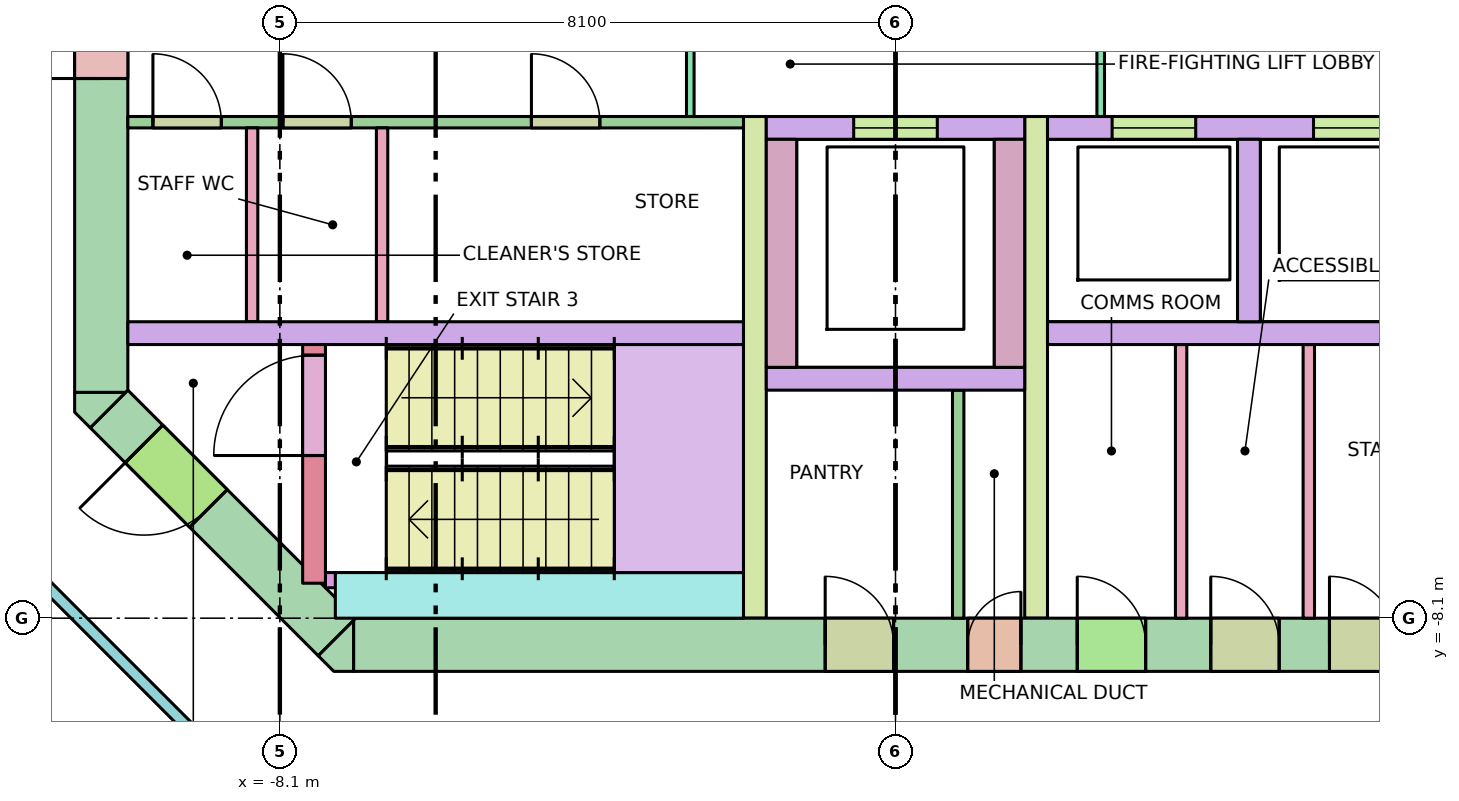
"""IFC4 building model, lengths in metres.
Left out: names, types, materials, properties, quantities, classifications, styles, units other than length and angle.
Written with IfcOpenShell. Run it as: python <this file> out.ifc"""

import sys

from ifc_helpers import new_model, si_unit, direction, frame, frame_2d, origin, place, context, subcontext, project, spatial, polyline, rectangle, outline, extrude, element, fill, save


model = new_model("IFC4")
c1 = context("Model", 3, precision=1e-05, world=origin(), true_north=direction((0.0, 1.0)))
c2 = subcontext(c1, "Body", "Model", "MODEL_VIEW")
j1 = project(units=[si_unit("LENGTHUNIT", "METRE"), si_unit("PLANEANGLEUNIT", "RADIAN")], contexts=[c1])
p1 = place(None, origin())
s1 = spatial("IfcSite", under=j1, at=p1, CompositionType="ELEMENT")
p2 = place(p1, origin())
s2 = spatial("IfcBuilding", under=s1, at=p2, CompositionType="ELEMENT")
p3 = place(p2, frame((0.0, 0.0, 237.2)))
s3 = spatial("IfcBuildingStorey", under=s2, at=p3, CompositionType="ELEMENT", Elevation=237.2)
p4 = place(p3, frame((-7.13, -8.45, -0.28), z_axis=(0.0, 0.0, 1.0), x_axis=(1.0, 0.0, 0.0)))
e1 = element("IfcWall", 1, at=p4, inside=s3, PredefinedType="SHEAR", context=c2, shape_type="SweptSolid", body=[
    extrude(rectangle(XDim=14.26, YDim=0.7, at=frame_2d((7.13, 0.0))), origin(), (0.0, 0.0, 1.0), 3.7),
])
p5 = place(p4, frame((8.08, 0.0, 0.28)))
e2 = element("IfcOpeningElement", 2, at=p5, cuts=e1, PredefinedType="OPENING", context=c2, shape_type="SweptSolid", body=[
    extrude(rectangle(XDim=0.7, YDim=2.1, at=frame_2d((0.35, 1.05))), frame((0.0, 0.36, 0.0), z_axis=(0.0, -1.0, 0.0), x_axis=(1.0, 0.0, 0.0)), (0.0, 0.0, 1.0), 0.72),
])
p6 = place(p4, frame((6.205, 0.0, 0.28)))
e3 = element("IfcOpeningElement", 3, at=p6, cuts=e1, PredefinedType="OPENING", context=c2, shape_type="SweptSolid", body=[
    extrude(rectangle(XDim=0.9, YDim=2.1, at=frame_2d((0.45, 1.05))), frame((0.0, 0.36, 0.0), z_axis=(0.0, -1.0, 0.0), x_axis=(1.0, 0.0, 0.0)), (0.0, 0.0, 1.0), 0.72),
])
p7 = place(p4, frame((9.521, 0.0, 0.28)))
e4 = element("IfcOpeningElement", 4, at=p7, cuts=e1, PredefinedType="OPENING", context=c2, shape_type="SweptSolid", body=[
    extrude(rectangle(XDim=0.9, YDim=2.1, at=frame_2d((0.45, 1.05))), frame((0.0, 0.36, 0.0), z_axis=(0.0, -1.0, 0.0), x_axis=(1.0, 0.0, 0.0)), (0.0, 0.0, 1.0), 0.72),
])
p8 = place(p4, frame((11.278, 0.0, 0.28)))
e5 = element("IfcOpeningElement", 5, at=p8, cuts=e1, PredefinedType="OPENING", context=c2, shape_type="SweptSolid", body=[
    extrude(rectangle(XDim=0.9, YDim=2.1, at=frame_2d((0.45, 1.05))), frame((0.0, 0.36, 0.0), z_axis=(0.0, -1.0, 0.0), x_axis=(1.0, 0.0, 0.0)), (0.0, 0.0, 1.0), 0.72),
])
p9 = place(p4, frame((12.84, 0.0, 0.28)))
e6 = element("IfcOpeningElement", 6, at=p9, cuts=e1, PredefinedType="OPENING", context=c2, shape_type="SweptSolid", body=[
    extrude(rectangle(XDim=0.9, YDim=2.1, at=frame_2d((0.45, 1.05))), frame((0.0, 0.36, 0.0), z_axis=(0.0, -1.0, 0.0), x_axis=(1.0, 0.0, 0.0)), (0.0, 0.0, 1.0), 0.72),
])
p10 = place(p3, frame((-10.45, -5.13, -0.28), z_axis=(0.0, 0.0, 1.0), x_axis=(0.0, 1.0, 0.0)))
e7 = element("IfcWall", 7, at=p10, inside=s3, PredefinedType="SHEAR", context=c2, shape_type="SweptSolid", body=[
    extrude(rectangle(XDim=10.26, YDim=0.7, at=frame_2d((5.13, 0.0))), origin(), (0.0, 0.0, 1.0), 3.7),
])
p11 = place(p10, frame((4.13, 0.0, 0.28)))
e8 = element("IfcOpeningElement", 8, at=p11, cuts=e7, PredefinedType="OPENING", context=c2, shape_type="SweptSolid", body=[
    extrude(rectangle(XDim=2.0, YDim=2.1, at=frame_2d((1.0, 1.05))), frame((0.0, 0.36, 0.0), z_axis=(0.0, -1.0, 0.0), x_axis=(1.0, 0.0, 0.0)), (0.0, 0.0, 1.0), 0.72),
])
p12 = place(p3, frame((-7.347, -8.347, -0.28), z_axis=(0.0, 0.0, 1.0), x_axis=(-0.707106781187, 0.707106781187, 0.0)))
e9 = element("IfcWall", 9, at=p12, inside=s3, PredefinedType="SHEAR", context=c2, shape_type="SweptSolid", body=[
    extrude(rectangle(XDim=4.243, YDim=0.7, at=frame_2d((2.121, 0.0))), origin(), (0.0, 0.0, 1.0), 3.7),
])
p13 = place(p12, frame((2.393, 0.0, 0.28)))
e10 = element("IfcOpeningElement", 10, at=p13, cuts=e9, PredefinedType="OPENING", context=c2, shape_type="SweptSolid", body=[
    extrude(rectangle(XDim=1.2, YDim=2.1, at=frame_2d((0.6, 1.05))), frame((0.0, 0.36, 0.0), z_axis=(0.0, -1.0, 0.0), x_axis=(1.0, 0.0, 0.0)), (0.0, 0.0, 1.0), 0.72),
])
p14 = place(p3, frame((0.0, 0.0, -0.28)))
e11 = element("IfcWall", 11, at=p14, inside=s3, PredefinedType="SHEAR", context=c2, shape_type="SweptSolid", body=[
    extrude(outline(polyline([(-7.39, -8.8), (-7.595, -8.595), (-7.595, -8.595), (-7.595, -8.595), (-7.13, -8.13), (-7.13, -8.8), (-7.13, -8.8), (-7.39, -8.8)])), origin(), (0.0, 0.0, 1.0), 3.7),
])
p15 = place(p3, frame((0.0, 0.0, -0.28)))
e12 = element("IfcWall", 12, at=p15, inside=s3, PredefinedType="SHEAR", context=c2, shape_type="SweptSolid", body=[
    extrude(outline(polyline([(-10.8, -5.39), (-10.8, -5.13), (-10.8, -5.13), (-10.13, -5.13), (-10.595, -5.595), (-10.595, -5.595), (-10.595, -5.595), (-10.8, -5.39)])), origin(), (0.0, 0.0, 1.0), 3.7),
])
for number, where, z_axis, x_axis in (
    (13, (-10.1, -4.35, 0.0), (0.0, 0.0, 1.0), (1.0, 0.0, 0.0)),
    (14, (2.0, -4.35, 0.0), (0.0, 0.0, 1.0), (1.0, 0.0, 0.0)),
):
    element("IfcWall", number, at=place(p3, frame(where, z_axis=z_axis, x_axis=x_axis)), inside=s3, PredefinedType="SOLIDWALL", context=c2, shape_type="SweptSolid", body=[
        extrude(rectangle(XDim=8.1, YDim=0.3, at=frame_2d((4.05, 0.0))), origin(), (0.0, 0.0, 1.0), 3.42),
    ])
p16 = place(p3, frame((2.0, -1.65, 0.0), z_axis=(0.0, 0.0, 1.0), x_axis=(1.0, 0.0, 0.0)))
e15 = element("IfcWall", 15, at=p16, inside=s3, PredefinedType="SOLIDWALL", context=c2, shape_type="SweptSolid", body=[
    extrude(rectangle(XDim=8.1, YDim=0.3, at=frame_2d((4.05, 0.0))), origin(), (0.0, 0.0, 1.0), 3.42),
])
p17 = place(p16, frame((0.85, 0.0, 0.0)))
e16 = element("IfcOpeningElement", 16, at=p17, cuts=e15, PredefinedType="OPENING", context=c2, shape_type="SweptSolid", body=[
    extrude(rectangle(XDim=1.1, YDim=2.1, at=frame_2d((0.55, 1.05))), frame((0.0, 0.16, 0.0), z_axis=(0.0, -1.0, 0.0), x_axis=(1.0, 0.0, 0.0)), (0.0, 0.0, 1.0), 0.32),
])
p18 = place(p16, frame((3.5, 0.0, 0.0)))
e17 = element("IfcOpeningElement", 17, at=p18, cuts=e15, PredefinedType="OPENING", context=c2, shape_type="SweptSolid", body=[
    extrude(rectangle(XDim=1.1, YDim=2.1, at=frame_2d((0.55, 1.05))), frame((0.0, 0.16, 0.0), z_axis=(0.0, -1.0, 0.0), x_axis=(1.0, 0.0, 0.0)), (0.0, 0.0, 1.0), 0.32),
])
p19 = place(p16, frame((6.3, 0.0, 0.0)))
e18 = element("IfcOpeningElement", 18, at=p19, cuts=e15, PredefinedType="OPENING", context=c2, shape_type="SweptSolid", body=[
    extrude(rectangle(XDim=1.1, YDim=2.1, at=frame_2d((0.55, 1.05))), frame((0.0, 0.16, 0.0), z_axis=(0.0, -1.0, 0.0), x_axis=(1.0, 0.0, 0.0)), (0.0, 0.0, 1.0), 0.32),
])
p20 = place(p3, frame((4.65, -4.2, 0.0), z_axis=(0.0, 0.0, 1.0), x_axis=(0.0, 1.0, 0.0)))
e19 = element("IfcWall", 19, at=p20, inside=s3, PredefinedType="SOLIDWALL", context=c2, shape_type="SweptSolid", body=[
    extrude(rectangle(XDim=2.4, YDim=0.3, at=frame_2d((1.2, 0.0))), origin(), (0.0, 0.0, 1.0), 3.42),
])
for number, where, z_axis, x_axis in (
    (20, (-1.85, -8.1, 0.0), (0.0, 0.0, 1.0), (0.0, 1.0, 0.0)),
    (21, (1.85, -8.1, 0.0), (0.0, 0.0, 1.0), (0.0, 1.0, 0.0)),
):
    element("IfcWall", number, at=place(p3, frame(where, z_axis=z_axis, x_axis=x_axis)), inside=s3, PredefinedType="SHEAR", context=c2, shape_type="SweptSolid", body=[
        extrude(rectangle(XDim=6.6, YDim=0.3, at=frame_2d((3.3, 0.0))), origin(), (0.0, 0.0, 1.0), 3.42),
    ])
p21 = place(p3, frame((-1.7, -1.65, 0.0), z_axis=(0.0, 0.0, 1.0), x_axis=(1.0, 0.0, 0.0)))
e22 = element("IfcWall", 22, at=p21, inside=s3, PredefinedType="SOLIDWALL", context=c2, shape_type="SweptSolid", body=[
    extrude(rectangle(XDim=3.4, YDim=0.3, at=frame_2d((1.7, 0.0))), origin(), (0.0, 0.0, 1.0), 3.42),
])
p22 = place(p21, frame((1.15, 0.0, 0.0)))
e23 = element("IfcOpeningElement", 23, at=p22, cuts=e22, PredefinedType="OPENING", context=c2, shape_type="SweptSolid", body=[
    extrude(rectangle(XDim=1.1, YDim=2.1, at=frame_2d((0.55, 1.05))), frame((0.0, 0.16, 0.0), z_axis=(0.0, -1.0, 0.0), x_axis=(1.0, 0.0, 0.0)), (0.0, 0.0, 1.0), 0.32),
])
for number, where, z_axis, x_axis in (
    (24, (-1.5, -4.8, 0.0), (0.0, 0.0, 1.0), (0.0, 1.0, 0.0)),
    (25, (1.5, -4.8, 0.0), (0.0, 0.0, 1.0), (0.0, 1.0, 0.0)),
):
    element("IfcWall", number, at=place(p3, frame(where, z_axis=z_axis, x_axis=x_axis)), inside=s3, PredefinedType="SOLIDWALL", context=c2, shape_type="SweptSolid", body=[
        extrude(rectangle(XDim=3.0, YDim=0.4, at=frame_2d((1.5, 0.0))), origin(), (0.0, 0.0, 1.0), 3.42),
    ])
p23 = place(p3, frame((-1.7, -4.95, 0.0), z_axis=(0.0, 0.0, 1.0), x_axis=(1.0, 0.0, 0.0)))
e26 = element("IfcWall", 26, at=p23, inside=s3, PredefinedType="SOLIDWALL", context=c2, shape_type="SweptSolid", body=[
    extrude(rectangle(XDim=3.4, YDim=0.3, at=frame_2d((1.7, 0.0))), origin(), (0.0, 0.0, 1.0), 3.42),
])
p24 = place(p3, frame((-7.65, -7.64, 0.0), z_axis=(0.0, 0.0, 1.0), x_axis=(0.0, 1.0, 0.0)))
e27 = element("IfcWall", 27, at=p24, inside=s3, PredefinedType="SHEAR", context=c2, shape_type="SweptSolid", body=[
    extrude(rectangle(XDim=3.14, YDim=0.3, at=frame_2d((1.57, 0.0))), origin(), (0.0, 0.0, 1.0), 3.42),
])
p25 = place(p24, frame((1.68, 0.0, 0.0)))
e28 = element("IfcOpeningElement", 28, at=p25, cuts=e27, PredefinedType="OPENING", context=c2, shape_type="SweptSolid", body=[
    extrude(rectangle(XDim=1.32, YDim=2.1, at=frame_2d((0.66, 1.05))), frame((0.0, 0.16, 0.0), z_axis=(0.0, -1.0, 0.0), x_axis=(1.0, 0.0, 0.0)), (0.0, 0.0, 1.0), 0.32),
])
p26 = place(p3, frame((-7.5, -7.6, 0.0), z_axis=(0.0, 0.0, 1.0), x_axis=(1.0, 0.0, 0.0)))
e29 = element("IfcWall", 29, at=p26, inside=s3, PredefinedType="SHEAR", context=c2, shape_type="SweptSolid", body=[
    extrude(rectangle(XDim=0.6, YDim=0.2, at=frame_2d((0.3, 0.0))), origin(), (0.0, 0.0, 1.0), 3.42),
])
p27 = place(p3, frame((-7.37, -7.8, 0.0), z_axis=(0.0, 0.0, 1.0), x_axis=(1.0, 0.0, 0.0)))
e30 = element("IfcWall", 30, at=p27, inside=s3, PredefinedType="SHEAR", context=c2, shape_type="SweptSolid", body=[
    extrude(rectangle(XDim=5.37, YDim=0.6, at=frame_2d((2.685, 0.0))), origin(), (0.0, 0.0, 1.0), 3.42),
])
p28 = place(p3, frame((-2.7, -1.5, 0.0), z_axis=(0.0, 0.0, 1.0), x_axis=(0.0, 1.0, 0.0)))
e31 = element("IfcWall", 31, at=p28, inside=s3, PredefinedType="PARTITIONING", context=c2, shape_type="SweptSolid", body=[
    extrude(rectangle(XDim=3.0, YDim=0.1, at=frame_2d((1.5, 0.0))), origin(), (0.0, 0.0, 1.0), 3.42),
])
p29 = place(p28, frame((0.9, 0.0, 0.0)))
e32 = element("IfcOpeningElement", 32, at=p29, cuts=e31, PredefinedType="OPENING", context=c2, shape_type="SweptSolid", body=[
    extrude(rectangle(XDim=1.2, YDim=2.1, at=frame_2d((0.6, 1.05))), frame((0.0, 0.06, 0.0), z_axis=(0.0, -1.0, 0.0), x_axis=(1.0, 0.0, 0.0)), (0.0, 0.0, 1.0), 0.12),
])
p30 = place(p3, frame((2.7, -1.5, 0.0), z_axis=(0.0, 0.0, 1.0), x_axis=(0.0, 1.0, 0.0)))
e33 = element("IfcWall", 33, at=p30, inside=s3, PredefinedType="PARTITIONING", context=c2, shape_type="SweptSolid", body=[
    extrude(rectangle(XDim=3.0, YDim=0.1, at=frame_2d((1.5, 0.0))), origin(), (0.0, 0.0, 1.0), 3.42),
])
p31 = place(p30, frame((0.9, 0.0, 0.0)))
e34 = element("IfcOpeningElement", 34, at=p31, cuts=e33, PredefinedType="OPENING", context=c2, shape_type="SweptSolid", body=[
    extrude(rectangle(XDim=1.2, YDim=2.1, at=frame_2d((0.6, 1.05))), frame((0.0, 0.06, 0.0), z_axis=(0.0, -1.0, 0.0), x_axis=(1.0, 0.0, 0.0)), (0.0, 0.0, 1.0), 0.12),
])
p32 = place(p3, frame((0.825, -8.1, 0.0), z_axis=(0.0, 0.0, 1.0), x_axis=(0.0, 1.0, 0.0)))
e35 = element("IfcWall", 35, at=p32, inside=s3, PredefinedType="PARTITIONING", context=c2, shape_type="SweptSolid", body=[
    extrude(rectangle(XDim=3.0, YDim=0.15, at=frame_2d((1.5, 0.0))), origin(), (0.0, 0.0, 1.0), 3.42),
])
for number, where, z_axis, x_axis in (
    (36, (3.758, -8.1, 0.0), (0.0, 0.0, 1.0), (0.0, 1.0, 0.0)),
    (37, (5.438, -8.1, 0.0), (0.0, 0.0, 1.0), (0.0, 1.0, 0.0)),
):
    element("IfcWall", number, at=place(p3, frame(where, z_axis=z_axis, x_axis=x_axis)), inside=s3, PredefinedType="PARTITIONING", context=c2, shape_type="SweptSolid", body=[
        extrude(rectangle(XDim=3.6, YDim=0.15, at=frame_2d((1.8, 0.0))), origin(), (0.0, 0.0, 1.0), 3.42),
    ])
for number, where, z_axis, x_axis in (
    (38, (-8.465, -4.2, 0.0), (0.0, 0.0, 1.0), (0.0, 1.0, 0.0)),
    (39, (-6.755, -4.2, 0.0), (0.0, 0.0, 1.0), (0.0, 1.0, 0.0)),
):
    element("IfcWall", number, at=place(p3, frame(where, z_axis=z_axis, x_axis=x_axis)), inside=s3, PredefinedType="PARTITIONING", context=c2, shape_type="SweptSolid", body=[
        extrude(rectangle(XDim=2.55, YDim=0.15, at=frame_2d((1.275, 0.0))), origin(), (0.0, 0.0, 1.0), 3.42),
    ])
p33 = place(p3, frame((-10.1, -1.575, 0.0), z_axis=(0.0, 0.0, 1.0), x_axis=(1.0, 0.0, 0.0)))
e40 = element("IfcWall", 40, at=p33, inside=s3, PredefinedType="PARTITIONING", context=c2, shape_type="SweptSolid", body=[
    extrude(rectangle(XDim=8.1, YDim=0.15, at=frame_2d((4.05, 0.0))), origin(), (0.0, 0.0, 1.0), 3.42),
])
p34 = place(p33, frame((0.33, 0.0, 0.0)))
e41 = element("IfcOpeningElement", 41, at=p34, cuts=e40, PredefinedType="OPENING", context=c2, shape_type="SweptSolid", body=[
    extrude(rectangle(XDim=0.9, YDim=2.1, at=frame_2d((0.45, 1.05))), frame((0.0, 0.085, 0.0), z_axis=(0.0, -1.0, 0.0), x_axis=(1.0, 0.0, 0.0)), (0.0, 0.0, 1.0), 0.17),
])
p35 = place(p33, frame((2.04, 0.0, 0.0)))
e42 = element("IfcOpeningElement", 42, at=p35, cuts=e40, PredefinedType="OPENING", context=c2, shape_type="SweptSolid", body=[
    extrude(rectangle(XDim=0.9, YDim=2.1, at=frame_2d((0.45, 1.05))), frame((0.0, 0.085, 0.0), z_axis=(0.0, -1.0, 0.0), x_axis=(1.0, 0.0, 0.0)), (0.0, 0.0, 1.0), 0.17),
])
p36 = place(p33, frame((5.31, 0.0, 0.0)))
e43 = element("IfcOpeningElement", 43, at=p36, cuts=e40, PredefinedType="OPENING", context=c2, shape_type="SweptSolid", body=[
    extrude(rectangle(XDim=0.9, YDim=2.1, at=frame_2d((0.45, 1.05))), frame((0.0, 0.085, 0.0), z_axis=(0.0, -1.0, 0.0), x_axis=(1.0, 0.0, 0.0)), (0.0, 0.0, 1.0), 0.17),
])
p37 = place(p3, frame((-8.204, -10.638, 0.0), z_axis=(0.0, 0.0, 1.0), x_axis=(-0.707106781187, 0.707106781187, 0.0)))
e44 = element("IfcWall", 44, at=p37, inside=s3, PredefinedType="PARTITIONING", context=c2, shape_type="SweptSolid", body=[
    extrude(rectangle(XDim=5.291, YDim=0.15, at=frame_2d((2.646, 0.0))), origin(), (0.0, 0.0, 1.0), 2.57),
])
p38 = place(p17, origin())
e45 = element("IfcDoor", 45, at=p38, inside=s3, OperationType="DOUBLE_DOOR_SLIDING", PredefinedType="DOOR", context=c2, shape_type="SweptSolid", body=[
    extrude(rectangle(XDim=1.1, YDim=2.1, at=frame_2d((0.55, 1.05))), frame((0.0, 0.025, 0.0), z_axis=(0.0, -1.0, 0.0), x_axis=(1.0, 0.0, 0.0)), (0.0, 0.0, 1.0), 0.05),
])
fill(e16, e45)
p39 = place(p18, origin())
e46 = element("IfcDoor", 46, at=p39, inside=s3, OperationType="DOUBLE_DOOR_SLIDING", PredefinedType="DOOR", context=c2, shape_type="SweptSolid", body=[
    extrude(rectangle(XDim=1.1, YDim=2.1, at=frame_2d((0.55, 1.05))), frame((0.0, 0.025, 0.0), z_axis=(0.0, -1.0, 0.0), x_axis=(1.0, 0.0, 0.0)), (0.0, 0.0, 1.0), 0.05),
])
fill(e17, e46)
p40 = place(p22, origin())
e47 = element("IfcDoor", 47, at=p40, inside=s3, OperationType="DOUBLE_DOOR_SLIDING", PredefinedType="DOOR", context=c2, shape_type="SweptSolid", body=[
    extrude(rectangle(XDim=1.1, YDim=2.1, at=frame_2d((0.55, 1.05))), frame((0.0, 0.025, 0.0), z_axis=(0.0, -1.0, 0.0), x_axis=(1.0, 0.0, 0.0)), (0.0, 0.0, 1.0), 0.05),
])
fill(e23, e47)
p41 = place(p25, origin())
e48 = element("IfcDoor", 48, at=p41, inside=s3, OperationType="DOUBLE_DOOR_SINGLE_SWING", PredefinedType="DOOR", context=c2, shape_type="SweptSolid", body=[
    extrude(rectangle(XDim=1.32, YDim=2.1, at=frame_2d((0.66, 1.05))), frame((0.0, 0.025, 0.0), z_axis=(0.0, -1.0, 0.0), x_axis=(1.0, 0.0, 0.0)), (0.0, 0.0, 1.0), 0.05),
])
fill(e28, e48)
p42 = place(p13, origin())
e49 = element("IfcDoor", 49, at=p42, inside=s3, OperationType="SINGLE_SWING_RIGHT", PredefinedType="DOOR", context=c2, shape_type="SweptSolid", body=[
    extrude(rectangle(XDim=1.2, YDim=2.1, at=frame_2d((0.6, 1.05))), frame((0.0, 0.025, 0.0), z_axis=(0.0, -1.0, 0.0), x_axis=(1.0, 0.0, 0.0)), (0.0, 0.0, 1.0), 0.05),
])
fill(e10, e49)
p43 = place(p11, origin())
e50 = element("IfcDoor", 50, at=p43, inside=s3, OperationType="DOUBLE_DOOR_SINGLE_SWING", PredefinedType="DOOR", context=c2, shape_type="SweptSolid", body=[
    extrude(rectangle(XDim=2.0, YDim=2.1, at=frame_2d((1.0, 1.05))), frame((0.0, 0.025, 0.0), z_axis=(0.0, -1.0, 0.0), x_axis=(1.0, 0.0, 0.0)), (0.0, 0.0, 1.0), 0.05),
])
fill(e8, e50)
p44 = place(p5, origin())
e51 = element("IfcDoor", 51, at=p44, inside=s3, OperationType="SINGLE_SWING_RIGHT", PredefinedType="DOOR", context=c2, shape_type="SweptSolid", body=[
    extrude(rectangle(XDim=0.7, YDim=2.1, at=frame_2d((0.35, 1.05))), frame((0.0, 0.025, 0.0), z_axis=(0.0, -1.0, 0.0), x_axis=(1.0, 0.0, 0.0)), (0.0, 0.0, 1.0), 0.05),
])
fill(e2, e51)
p45 = place(p6, origin())
e52 = element("IfcDoor", 52, at=p45, inside=s3, OperationType="SINGLE_SWING_LEFT", PredefinedType="DOOR", context=c2, shape_type="SweptSolid", body=[
    extrude(rectangle(XDim=0.9, YDim=2.1, at=frame_2d((0.45, 1.05))), frame((0.0, 0.025, 0.0), z_axis=(0.0, -1.0, 0.0), x_axis=(1.0, 0.0, 0.0)), (0.0, 0.0, 1.0), 0.05),
])
fill(e3, e52)
p46 = place(p7, origin())
e53 = element("IfcDoor", 53, at=p46, inside=s3, OperationType="SINGLE_SWING_LEFT", PredefinedType="DOOR", context=c2, shape_type="SweptSolid", body=[
    extrude(rectangle(XDim=0.9, YDim=2.1, at=frame_2d((0.45, 1.05))), frame((0.0, 0.025, 0.0), z_axis=(0.0, -1.0, 0.0), x_axis=(1.0, 0.0, 0.0)), (0.0, 0.0, 1.0), 0.05),
])
fill(e4, e53)
p47 = place(p8, origin())
e54 = element("IfcDoor", 54, at=p47, inside=s3, OperationType="SINGLE_SWING_LEFT", PredefinedType="DOOR", context=c2, shape_type="SweptSolid", body=[
    extrude(rectangle(XDim=0.9, YDim=2.1, at=frame_2d((0.45, 1.05))), frame((0.0, 0.025, 0.0), z_axis=(0.0, -1.0, 0.0), x_axis=(1.0, 0.0, 0.0)), (0.0, 0.0, 1.0), 0.05),
])
fill(e5, e54)
p48 = place(p9, origin())
e55 = element("IfcDoor", 55, at=p48, inside=s3, OperationType="SINGLE_SWING_LEFT", PredefinedType="DOOR", context=c2, shape_type="SweptSolid", body=[
    extrude(rectangle(XDim=0.9, YDim=2.1, at=frame_2d((0.45, 1.05))), frame((0.0, 0.025, 0.0), z_axis=(0.0, -1.0, 0.0), x_axis=(1.0, 0.0, 0.0)), (0.0, 0.0, 1.0), 0.05),
])
fill(e6, e55)
p49 = place(p34, origin())
e56 = element("IfcDoor", 56, at=p49, inside=s3, OperationType="SINGLE_SWING_LEFT", PredefinedType="DOOR", context=c2, shape_type="SweptSolid", body=[
    extrude(rectangle(XDim=0.9, YDim=2.1, at=frame_2d((0.45, 1.05))), frame((0.0, 0.025, 0.0), z_axis=(0.0, -1.0, 0.0), x_axis=(1.0, 0.0, 0.0)), (0.0, 0.0, 1.0), 0.05),
])
fill(e41, e56)
p50 = place(p35, origin())
e57 = element("IfcDoor", 57, at=p50, inside=s3, OperationType="SINGLE_SWING_LEFT", PredefinedType="DOOR", context=c2, shape_type="SweptSolid", body=[
    extrude(rectangle(XDim=0.9, YDim=2.1, at=frame_2d((0.45, 1.05))), frame((0.0, 0.025, 0.0), z_axis=(0.0, -1.0, 0.0), x_axis=(1.0, 0.0, 0.0)), (0.0, 0.0, 1.0), 0.05),
])
fill(e42, e57)
p51 = place(p36, origin())
e58 = element("IfcDoor", 58, at=p51, inside=s3, OperationType="SINGLE_SWING_LEFT", PredefinedType="DOOR", context=c2, shape_type="SweptSolid", body=[
    extrude(rectangle(XDim=0.9, YDim=2.1, at=frame_2d((0.45, 1.05))), frame((0.0, 0.025, 0.0), z_axis=(0.0, -1.0, 0.0), x_axis=(1.0, 0.0, 0.0)), (0.0, 0.0, 1.0), 0.05),
])
fill(e43, e58)
save(model, sys.argv[1])
